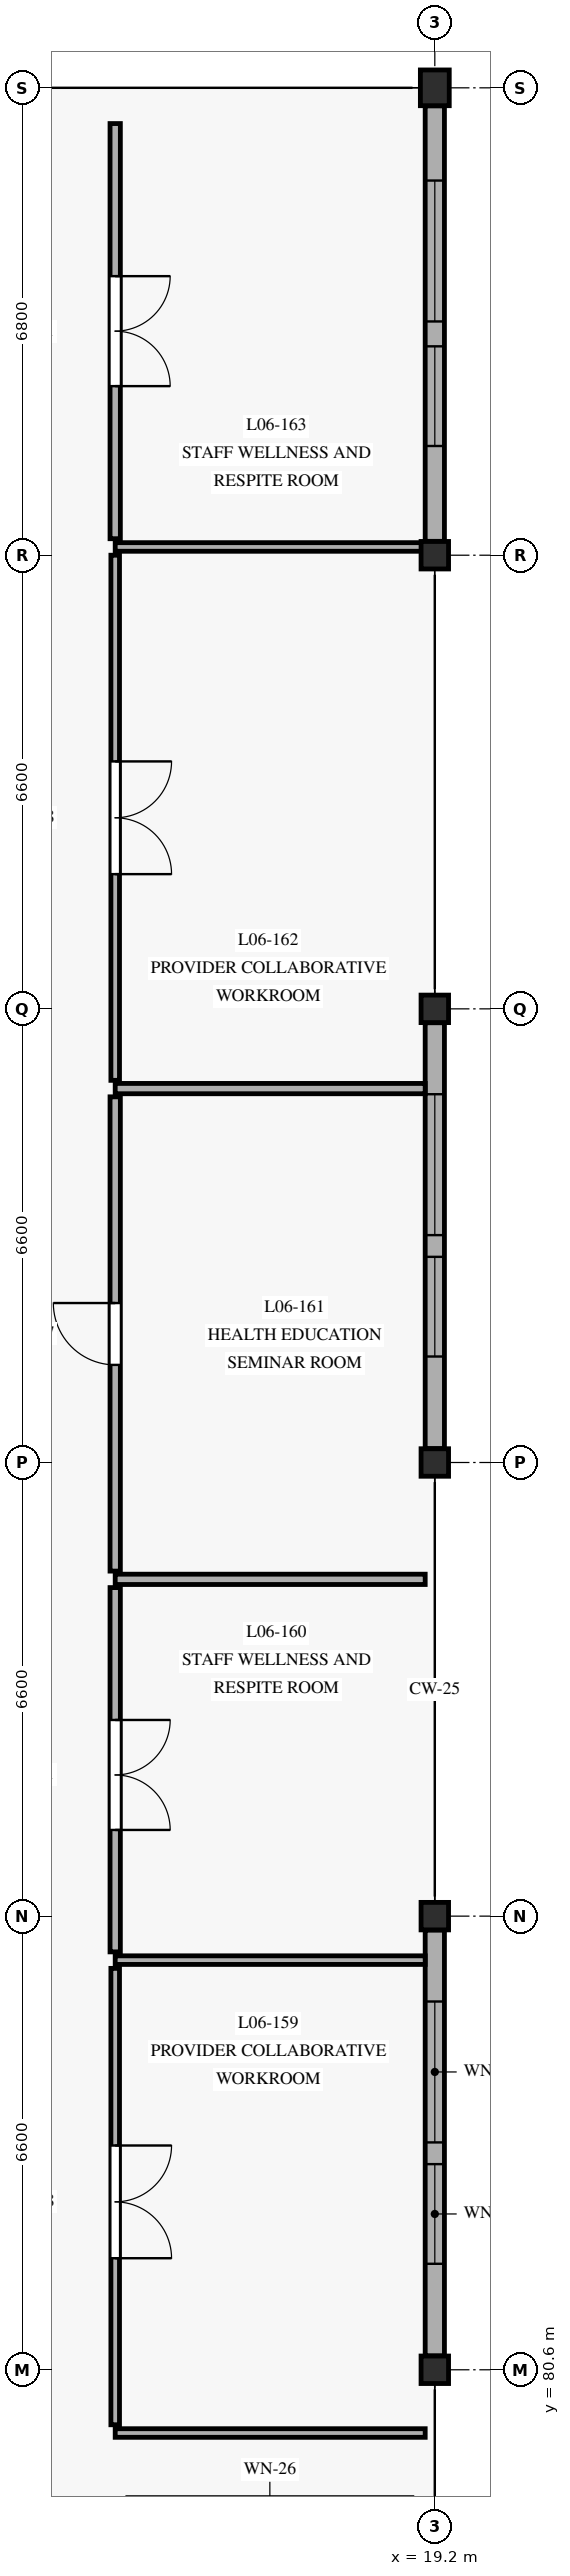
"""IFC4 building model, lengths in metres.
Left out: names, types, materials, properties, quantities, classifications, styles, units other than length and angle.
Written with IfcOpenShell. Run it as: python <this file> out.ifc"""

import sys

from ifc_helpers import new_model, si_unit, direction, frame, frame_2d, origin, origin_with_axes, origin_2d, place, context, subcontext, project, spatial, rectangle, extrude, element, fill, save


model = new_model("IFC4")
c1 = context("Model", 3, precision=1e-05, world=origin(), true_north=direction((0.0, 1.0)))
c2 = subcontext(c1, "Body", "Model", "MODEL_VIEW")
j1 = project(units=[si_unit("LENGTHUNIT", "METRE"), si_unit("PLANEANGLEUNIT", "RADIAN")], contexts=[c1])
p1 = place(None, origin())
s1 = spatial("IfcSite", under=j1, at=p1, CompositionType="ELEMENT")
p2 = place(p1, origin())
s2 = spatial("IfcBuilding", under=s1, at=p2, CompositionType="ELEMENT")
p3 = place(p2, frame((0.0, 0.0, 21.6)))
s3 = spatial("IfcBuildingStorey", under=s2, at=p3, CompositionType="ELEMENT", Elevation=21.6)
for number, where, z_axis, x_axis in (
    (1, (19.2, 80.6, 0.0), (0.0, 0.0, 1.0), (1.0, 0.0, 0.0)),
    (2, (19.2, 87.2, 0.0), (0.0, 0.0, 1.0), (1.0, 0.0, 0.0)),
    (3, (19.2, 93.8, 0.0), (0.0, 0.0, 1.0), (1.0, 0.0, 0.0)),
    (4, (19.2, 100.4, 0.0), (0.0, 0.0, 1.0), (1.0, 0.0, 0.0)),
    (5, (19.2, 107.0, 0.0), (0.0, 0.0, 1.0), (1.0, 0.0, 0.0)),
):
    element("IfcColumn", number, at=place(p3, frame(where, z_axis=z_axis, x_axis=x_axis)), inside=s3, PredefinedType="COLUMN", context=c2, shape_type="SweptSolid", body=[
        extrude(rectangle(XDim=0.4, YDim=0.4, at=origin_2d()), origin(), (0.0, 0.0, 1.0), 4.05),
    ])
p4 = place(p3, frame((19.2, 113.8, 0.0), z_axis=(0.0, 0.0, 1.0), x_axis=(1.0, 0.0, 0.0)))
e6 = element("IfcColumn", 6, at=p4, inside=s3, PredefinedType="COLUMN", context=c2, shape_type="SweptSolid", body=[
    extrude(rectangle(XDim=0.42, YDim=0.52, at=origin_2d()), origin(), (0.0, 0.0, 1.0), 4.05),
])
p5 = place(p3, frame((19.2, 80.802, 0.0), z_axis=(0.0, 0.0, 1.0), x_axis=(0.0, 1.0, 0.0)))
e7 = element("IfcWall", 7, at=p5, inside=s3, PredefinedType="SOLIDWALL", context=c2, shape_type="SweptSolid", body=[
    extrude(rectangle(XDim=6.196, YDim=0.28, at=frame_2d((3.098, 0.0))), origin(), (0.0, 0.0, 1.0), 3.46),
])
p6 = place(p5, frame((1.34, 0.0, 0.85)))
e8 = element("IfcOpeningElement", 8, at=p6, cuts=e7, PredefinedType="OPENING", context=c2, shape_type="SweptSolid", body=[
    extrude(rectangle(XDim=1.45, YDim=1.95, at=frame_2d((0.725, 0.975))), frame((0.0, 0.15, 0.0), z_axis=(0.0, -1.0, 0.0), x_axis=(1.0, 0.0, 0.0)), (0.0, 0.0, 1.0), 0.3),
])
p7 = place(p5, frame((3.106, 0.0, 0.85)))
e9 = element("IfcOpeningElement", 9, at=p7, cuts=e7, PredefinedType="OPENING", context=c2, shape_type="SweptSolid", body=[
    extrude(rectangle(XDim=2.05, YDim=1.95, at=frame_2d((1.025, 0.975))), frame((0.0, 0.15, 0.0), z_axis=(0.0, -1.0, 0.0), x_axis=(1.0, 0.0, 0.0)), (0.0, 0.0, 1.0), 0.3),
])
p8 = place(p3, frame((19.2, 94.002, 0.0), z_axis=(0.0, 0.0, 1.0), x_axis=(0.0, 1.0, 0.0)))
e10 = element("IfcWall", 10, at=p8, inside=s3, PredefinedType="SOLIDWALL", context=c2, shape_type="SweptSolid", body=[
    extrude(rectangle(XDim=6.196, YDim=0.28, at=frame_2d((3.098, 0.0))), origin(), (0.0, 0.0, 1.0), 3.46),
])
p9 = place(p8, frame((1.34, 0.0, 0.85)))
e11 = element("IfcOpeningElement", 11, at=p9, cuts=e10, PredefinedType="OPENING", context=c2, shape_type="SweptSolid", body=[
    extrude(rectangle(XDim=1.45, YDim=1.95, at=frame_2d((0.725, 0.975))), frame((0.0, 0.15, 0.0), z_axis=(0.0, -1.0, 0.0), x_axis=(1.0, 0.0, 0.0)), (0.0, 0.0, 1.0), 0.3),
])
p10 = place(p8, frame((3.106, 0.0, 0.85)))
e12 = element("IfcOpeningElement", 12, at=p10, cuts=e10, PredefinedType="OPENING", context=c2, shape_type="SweptSolid", body=[
    extrude(rectangle(XDim=2.05, YDim=1.95, at=frame_2d((1.025, 0.975))), frame((0.0, 0.15, 0.0), z_axis=(0.0, -1.0, 0.0), x_axis=(1.0, 0.0, 0.0)), (0.0, 0.0, 1.0), 0.3),
])
p11 = place(p3, frame((19.2, 107.202, 0.0), z_axis=(0.0, 0.0, 1.0), x_axis=(0.0, 1.0, 0.0)))
e13 = element("IfcWall", 13, at=p11, inside=s3, PredefinedType="SOLIDWALL", context=c2, shape_type="SweptSolid", body=[
    extrude(rectangle(XDim=6.336, YDim=0.28, at=frame_2d((3.168, 0.0))), origin(), (0.0, 0.0, 1.0), 3.46),
])
p12 = place(p11, frame((1.387, 0.0, 0.85)))
e14 = element("IfcOpeningElement", 14, at=p12, cuts=e13, PredefinedType="OPENING", context=c2, shape_type="SweptSolid", body=[
    extrude(rectangle(XDim=1.45, YDim=1.95, at=frame_2d((0.725, 0.975))), frame((0.0, 0.15, 0.0), z_axis=(0.0, -1.0, 0.0), x_axis=(1.0, 0.0, 0.0)), (0.0, 0.0, 1.0), 0.3),
])
p13 = place(p11, frame((3.199, 0.0, 0.85)))
e15 = element("IfcOpeningElement", 15, at=p13, cuts=e13, PredefinedType="OPENING", context=c2, shape_type="SweptSolid", body=[
    extrude(rectangle(XDim=2.05, YDim=1.95, at=frame_2d((1.025, 0.975))), frame((0.0, 0.15, 0.0), z_axis=(0.0, -1.0, 0.0), x_axis=(1.0, 0.0, 0.0)), (0.0, 0.0, 1.0), 0.3),
])
p14 = place(p3, frame((14.55, 79.8, 0.0), z_axis=(0.0, 0.0, 1.0), x_axis=(0.0, 1.0, 0.0)))
e16 = element("IfcWall", 16, at=p14, inside=s3, PredefinedType="PARTITIONING", context=c2, shape_type="SweptSolid", body=[
    extrude(rectangle(XDim=6.64, YDim=0.125, at=frame_2d((3.32, 0.0))), origin(), (0.0, 0.0, 1.0), 3.435),
])
p15 = place(p14, frame((2.423, 0.0, 0.0)))
e17 = element("IfcOpeningElement", 17, at=p15, cuts=e16, PredefinedType="OPENING", context=c2, shape_type="SweptSolid", body=[
    extrude(rectangle(XDim=1.64, YDim=2.32, at=frame_2d((0.82, 1.16))), frame((0.0, 0.073, 0.0), z_axis=(0.0, -1.0, 0.0), x_axis=(1.0, 0.0, 0.0)), (0.0, 0.0, 1.0), 0.145),
])
for number, where, z_axis, x_axis in (
    (18, (14.55, 79.68, 0.0), (0.0, 0.0, 1.0), (1.0, 0.0, 0.0)),
    (19, (14.55, 86.56, 0.0), (0.0, 0.0, 1.0), (1.0, 0.0, 0.0)),
):
    element("IfcWall", number, at=place(p3, frame(where, z_axis=z_axis, x_axis=x_axis)), inside=s3, PredefinedType="PARTITIONING", context=c2, shape_type="SweptSolid", body=[
        extrude(rectangle(XDim=4.51, YDim=0.125, at=frame_2d((2.255, 0.0))), origin(), (0.0, 0.0, 1.0), 3.455),
    ])
p16 = place(p3, frame((14.55, 86.68, 0.0), z_axis=(0.0, 0.0, 1.0), x_axis=(0.0, 1.0, 0.0)))
e20 = element("IfcWall", 20, at=p16, inside=s3, PredefinedType="PARTITIONING", context=c2, shape_type="SweptSolid", body=[
    extrude(rectangle(XDim=5.3, YDim=0.15, at=frame_2d((2.65, 0.0))), origin(), (0.0, 0.0, 1.0), 3.435),
])
p17 = place(p16, frame((1.774, 0.0, 0.0)))
e21 = element("IfcOpeningElement", 21, at=p17, cuts=e20, PredefinedType="OPENING", context=c2, shape_type="SweptSolid", body=[
    extrude(rectangle(XDim=1.6, YDim=2.25, at=frame_2d((0.8, 1.125))), frame((0.0, 0.085, 0.0), z_axis=(0.0, -1.0, 0.0), x_axis=(1.0, 0.0, 0.0)), (0.0, 0.0, 1.0), 0.17),
])
p18 = place(p3, frame((14.55, 92.1, 0.0), z_axis=(0.0, 0.0, 1.0), x_axis=(1.0, 0.0, 0.0)))
e22 = element("IfcWall", 22, at=p18, inside=s3, PredefinedType="PARTITIONING", context=c2, shape_type="SweptSolid", body=[
    extrude(rectangle(XDim=4.51, YDim=0.15, at=frame_2d((2.255, 0.0))), origin(), (0.0, 0.0, 1.0), 3.455),
])
p19 = place(p3, frame((14.55, 92.22, 0.0), z_axis=(0.0, 0.0, 1.0), x_axis=(0.0, 1.0, 0.0)))
e23 = element("IfcWall", 23, at=p19, inside=s3, PredefinedType="PARTITIONING", context=c2, shape_type="SweptSolid", body=[
    extrude(rectangle(XDim=6.9, YDim=0.15, at=frame_2d((3.45, 0.0))), origin(), (0.0, 0.0, 1.0), 3.435),
])
p20 = place(p19, frame((3.0, 0.0, 0.0)))
e24 = element("IfcOpeningElement", 24, at=p20, cuts=e23, PredefinedType="OPENING", context=c2, shape_type="SweptSolid", body=[
    extrude(rectangle(XDim=0.9, YDim=2.12, at=frame_2d((0.45, 1.06))), frame((0.0, 0.085, 0.0), z_axis=(0.0, -1.0, 0.0), x_axis=(1.0, 0.0, 0.0)), (0.0, 0.0, 1.0), 0.17),
])
p21 = place(p3, frame((14.55, 99.24, 0.0), z_axis=(0.0, 0.0, 1.0), x_axis=(1.0, 0.0, 0.0)))
e25 = element("IfcWall", 25, at=p21, inside=s3, PredefinedType="PARTITIONING", context=c2, shape_type="SweptSolid", body=[
    extrude(rectangle(XDim=4.51, YDim=0.15, at=frame_2d((2.255, 0.0))), origin(), (0.0, 0.0, 1.0), 3.455),
])
p22 = place(p3, frame((14.55, 99.36, 0.0), z_axis=(0.0, 0.0, 1.0), x_axis=(0.0, 1.0, 0.0)))
e26 = element("IfcWall", 26, at=p22, inside=s3, PredefinedType="PARTITIONING", context=c2, shape_type="SweptSolid", body=[
    extrude(rectangle(XDim=7.64, YDim=0.125, at=frame_2d((3.82, 0.0))), origin(), (0.0, 0.0, 1.0), 3.435),
])
p23 = place(p22, frame((3.0, 0.0, 0.0)))
e27 = element("IfcOpeningElement", 27, at=p23, cuts=e26, PredefinedType="OPENING", context=c2, shape_type="SweptSolid", body=[
    extrude(rectangle(XDim=1.64, YDim=2.32, at=frame_2d((0.82, 1.16))), frame((0.0, 0.073, 0.0), z_axis=(0.0, -1.0, 0.0), x_axis=(1.0, 0.0, 0.0)), (0.0, 0.0, 1.0), 0.145),
])
p24 = place(p3, frame((14.55, 107.12, 0.0), z_axis=(0.0, 0.0, 1.0), x_axis=(1.0, 0.0, 0.0)))
e28 = element("IfcWall", 28, at=p24, inside=s3, PredefinedType="PARTITIONING", context=c2, shape_type="SweptSolid", body=[
    extrude(rectangle(XDim=4.51, YDim=0.125, at=frame_2d((2.255, 0.0))), origin(), (0.0, 0.0, 1.0), 3.435),
])
p25 = place(p3, frame((14.55, 107.24, 0.0), z_axis=(0.0, 0.0, 1.0), x_axis=(0.0, 1.0, 0.0)))
e29 = element("IfcWall", 29, at=p25, inside=s3, PredefinedType="PARTITIONING", context=c2, shape_type="SweptSolid", body=[
    extrude(rectangle(XDim=6.04, YDim=0.15, at=frame_2d((3.02, 0.0))), origin(), (0.0, 0.0, 1.0), 3.435),
])
p26 = place(p25, frame((2.22, 0.0, 0.0)))
e30 = element("IfcOpeningElement", 30, at=p26, cuts=e29, PredefinedType="OPENING", context=c2, shape_type="SweptSolid", body=[
    extrude(rectangle(XDim=1.6, YDim=2.25, at=frame_2d((0.8, 1.125))), frame((0.0, 0.085, 0.0), z_axis=(0.0, -1.0, 0.0), x_axis=(1.0, 0.0, 0.0)), (0.0, 0.0, 1.0), 0.17),
])
p27 = place(p6, origin_with_axes())
e31 = element("IfcWindow", 31, at=p27, inside=s3, PartitioningType="SINGLE_PANEL", PredefinedType="WINDOW", context=c2, shape_type="SweptSolid", body=[
    extrude(rectangle(XDim=1.45, YDim=1.95, at=frame_2d((0.725, 0.975))), frame((0.0, 0.03, 0.0), z_axis=(0.0, -1.0, 0.0), x_axis=(1.0, 0.0, 0.0)), (0.0, 0.0, 1.0), 0.06),
])
fill(e8, e31)
p28 = place(p7, origin_with_axes())
e32 = element("IfcWindow", 32, at=p28, inside=s3, PartitioningType="SINGLE_PANEL", PredefinedType="WINDOW", context=c2, shape_type="SweptSolid", body=[
    extrude(rectangle(XDim=2.05, YDim=1.95, at=frame_2d((1.025, 0.975))), frame((0.0, 0.03, 0.0), z_axis=(0.0, -1.0, 0.0), x_axis=(1.0, 0.0, 0.0)), (0.0, 0.0, 1.0), 0.06),
])
fill(e9, e32)
p29 = place(p9, origin_with_axes())
e33 = element("IfcWindow", 33, at=p29, inside=s3, PartitioningType="SINGLE_PANEL", PredefinedType="WINDOW", context=c2, shape_type="SweptSolid", body=[
    extrude(rectangle(XDim=1.45, YDim=1.95, at=frame_2d((0.725, 0.975))), frame((0.0, 0.03, 0.0), z_axis=(0.0, -1.0, 0.0), x_axis=(1.0, 0.0, 0.0)), (0.0, 0.0, 1.0), 0.06),
])
fill(e11, e33)
p30 = place(p10, origin_with_axes())
e34 = element("IfcWindow", 34, at=p30, inside=s3, PartitioningType="SINGLE_PANEL", PredefinedType="WINDOW", context=c2, shape_type="SweptSolid", body=[
    extrude(rectangle(XDim=2.05, YDim=1.95, at=frame_2d((1.025, 0.975))), frame((0.0, 0.03, 0.0), z_axis=(0.0, -1.0, 0.0), x_axis=(1.0, 0.0, 0.0)), (0.0, 0.0, 1.0), 0.06),
])
fill(e12, e34)
p31 = place(p12, origin_with_axes())
e35 = element("IfcWindow", 35, at=p31, inside=s3, PartitioningType="SINGLE_PANEL", PredefinedType="WINDOW", context=c2, shape_type="SweptSolid", body=[
    extrude(rectangle(XDim=1.45, YDim=1.95, at=frame_2d((0.725, 0.975))), frame((0.0, 0.03, 0.0), z_axis=(0.0, -1.0, 0.0), x_axis=(1.0, 0.0, 0.0)), (0.0, 0.0, 1.0), 0.06),
])
fill(e14, e35)
p32 = place(p13, origin_with_axes())
e36 = element("IfcWindow", 36, at=p32, inside=s3, PartitioningType="SINGLE_PANEL", PredefinedType="WINDOW", context=c2, shape_type="SweptSolid", body=[
    extrude(rectangle(XDim=2.05, YDim=1.95, at=frame_2d((1.025, 0.975))), frame((0.0, 0.03, 0.0), z_axis=(0.0, -1.0, 0.0), x_axis=(1.0, 0.0, 0.0)), (0.0, 0.0, 1.0), 0.06),
])
fill(e15, e36)
p33 = place(p15, frame((1.64, 0.0, 0.0), z_axis=(0.0, 0.0, 1.0), x_axis=(-1.0, 0.0, 0.0)))
e37 = element("IfcDoor", 37, at=p33, inside=s3, OperationType="DOUBLE_DOOR_SINGLE_SWING", PredefinedType="DOOR", context=c2, shape_type="SweptSolid", body=[
    extrude(rectangle(XDim=1.64, YDim=2.32, at=frame_2d((0.82, 1.16))), frame((0.0, 0.025, 0.0), z_axis=(0.0, -1.0, 0.0), x_axis=(1.0, 0.0, 0.0)), (0.0, 0.0, 1.0), 0.05),
])
fill(e17, e37)
p34 = place(p17, frame((1.6, 0.0, 0.0), z_axis=(0.0, 0.0, 1.0), x_axis=(-1.0, 0.0, 0.0)))
e38 = element("IfcDoor", 38, at=p34, inside=s3, OperationType="DOUBLE_DOOR_SINGLE_SWING", PredefinedType="DOOR", context=c2, shape_type="SweptSolid", body=[
    extrude(rectangle(XDim=1.6, YDim=2.25, at=frame_2d((0.8, 1.125))), frame((0.0, 0.025, 0.0), z_axis=(0.0, -1.0, 0.0), x_axis=(1.0, 0.0, 0.0)), (0.0, 0.0, 1.0), 0.05),
])
fill(e21, e38)
p35 = place(p20, frame((0.9, 0.0, 0.0), z_axis=(0.0, 0.0, 1.0), x_axis=(-1.0, 0.0, 0.0)))
e39 = element("IfcDoor", 39, at=p35, inside=s3, OperationType="SINGLE_SWING_LEFT", PredefinedType="DOOR", context=c2, shape_type="SweptSolid", body=[
    extrude(rectangle(XDim=0.9, YDim=2.12, at=frame_2d((0.45, 1.06))), frame((0.0, 0.025, 0.0), z_axis=(0.0, -1.0, 0.0), x_axis=(1.0, 0.0, 0.0)), (0.0, 0.0, 1.0), 0.05),
])
fill(e24, e39)
p36 = place(p23, frame((1.64, 0.0, 0.0), z_axis=(0.0, 0.0, 1.0), x_axis=(-1.0, 0.0, 0.0)))
e40 = element("IfcDoor", 40, at=p36, inside=s3, OperationType="DOUBLE_DOOR_SINGLE_SWING", PredefinedType="DOOR", context=c2, shape_type="SweptSolid", body=[
    extrude(rectangle(XDim=1.64, YDim=2.32, at=frame_2d((0.82, 1.16))), frame((0.0, 0.025, 0.0), z_axis=(0.0, -1.0, 0.0), x_axis=(1.0, 0.0, 0.0)), (0.0, 0.0, 1.0), 0.05),
])
fill(e27, e40)
p37 = place(p26, frame((1.6, 0.0, 0.0), z_axis=(0.0, 0.0, 1.0), x_axis=(-1.0, 0.0, 0.0)))
e41 = element("IfcDoor", 41, at=p37, inside=s3, OperationType="DOUBLE_DOOR_SINGLE_SWING", PredefinedType="DOOR", context=c2, shape_type="SweptSolid", body=[
    extrude(rectangle(XDim=1.6, YDim=2.25, at=frame_2d((0.8, 1.125))), frame((0.0, 0.025, 0.0), z_axis=(0.0, -1.0, 0.0), x_axis=(1.0, 0.0, 0.0)), (0.0, 0.0, 1.0), 0.05),
])
fill(e30, e41)
save(model, sys.argv[1])
